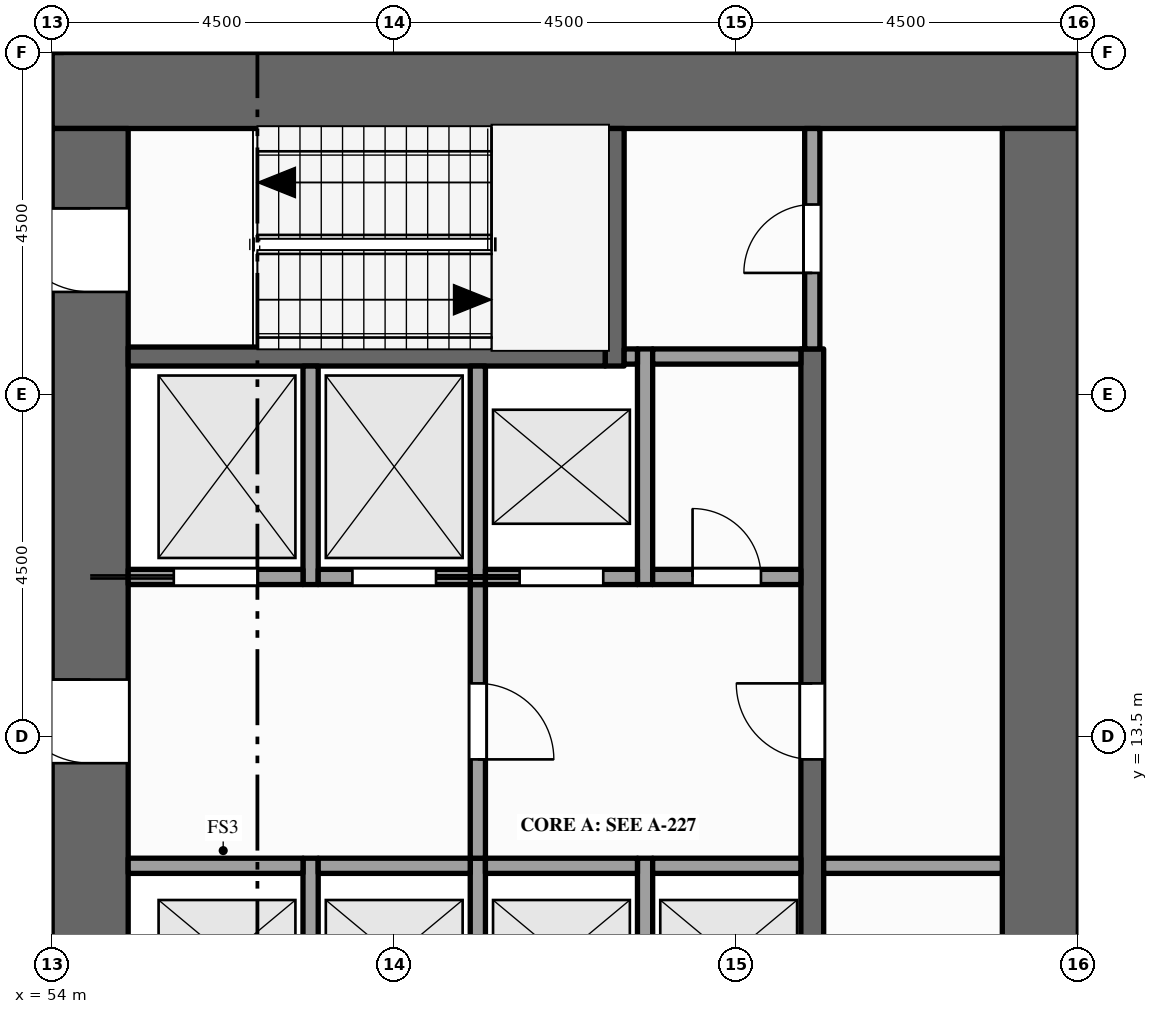
"""IFC4 building model, lengths in metres.
Left out: names, types, materials, properties, quantities, classifications, styles, units other than length and angle.
Written with IfcOpenShell. Run it as: python <this file> out.ifc"""

import sys

from ifc_helpers import new_model, si_unit, direction, frame, frame_2d, origin, place, context, subcontext, project, spatial, rectangle, extrude, element, fill, save


model = new_model("IFC4")
c1 = context("Model", 3, precision=1e-05, world=origin(), true_north=direction((0.0, 1.0)))
c2 = subcontext(c1, "Body", "Model", "MODEL_VIEW")
j1 = project(units=[si_unit("LENGTHUNIT", "METRE"), si_unit("PLANEANGLEUNIT", "RADIAN")], contexts=[c1])
p1 = place(None, origin())
s1 = spatial("IfcSite", under=j1, at=p1, CompositionType="ELEMENT")
p2 = place(p1, origin())
s2 = spatial("IfcBuilding", under=s1, at=p2, CompositionType="ELEMENT")
p3 = place(p2, frame((0.0, 0.0, 147.0)))
s3 = spatial("IfcBuildingStorey", under=s2, at=p3, CompositionType="ELEMENT", Elevation=147.0)
p4 = place(p3, frame((54.0, 22.0, -0.15), z_axis=(0.0, 0.0, 1.0), x_axis=(1.0, 0.0, 0.0)))
e1 = element("IfcWall", 1, at=p4, inside=s3, PredefinedType="SHEAR", context=c2, shape_type="SweptSolid", body=[
    extrude(rectangle(XDim=13.5, YDim=1.0, at=frame_2d((6.75, 0.0))), origin(), (0.0, 0.0, 1.0), 4.0),
])
p5 = place(p3, frame((54.5, 1.0, -0.15), z_axis=(0.0, 0.0, 1.0), x_axis=(0.0, 1.0, 0.0)))
e2 = element("IfcWall", 2, at=p5, inside=s3, PredefinedType="SHEAR", context=c2, shape_type="SweptSolid", body=[
    extrude(rectangle(XDim=20.5, YDim=1.0, at=frame_2d((10.25, 0.0))), origin(), (0.0, 0.0, 1.0), 4.0),
])
p6 = place(p5, frame((6.1, 0.0, 0.15)))
e3 = element("IfcOpeningElement", 3, at=p6, cuts=e2, PredefinedType="OPENING", context=c2, shape_type="SweptSolid", body=[
    extrude(rectangle(XDim=1.8, YDim=2.1, at=frame_2d((0.9, 1.05))), frame((0.0, 0.51, 0.0), z_axis=(0.0, -1.0, 0.0), x_axis=(1.0, 0.0, 0.0)), (0.0, 0.0, 1.0), 1.02),
])
p7 = place(p5, frame((12.15, 0.0, 0.15)))
e4 = element("IfcOpeningElement", 4, at=p7, cuts=e2, PredefinedType="OPENING", context=c2, shape_type="SweptSolid", body=[
    extrude(rectangle(XDim=1.1, YDim=2.1, at=frame_2d((0.55, 1.05))), frame((0.0, 0.51, 0.0), z_axis=(0.0, -1.0, 0.0), x_axis=(1.0, 0.0, 0.0)), (0.0, 0.0, 1.0), 1.02),
])
p8 = place(p5, frame((1.15, 0.0, 0.15)))
e5 = element("IfcOpeningElement", 5, at=p8, cuts=e2, PredefinedType="OPENING", context=c2, shape_type="SweptSolid", body=[
    extrude(rectangle(XDim=1.1, YDim=2.1, at=frame_2d((0.55, 1.05))), frame((0.0, 0.51, 0.0), z_axis=(0.0, -1.0, 0.0), x_axis=(1.0, 0.0, 0.0)), (0.0, 0.0, 1.0), 1.02),
])
p9 = place(p5, frame((18.35, 0.0, 0.15)))
e6 = element("IfcOpeningElement", 6, at=p9, cuts=e2, PredefinedType="OPENING", context=c2, shape_type="SweptSolid", body=[
    extrude(rectangle(XDim=1.1, YDim=2.1, at=frame_2d((0.55, 1.05))), frame((0.0, 0.51, 0.0), z_axis=(0.0, -1.0, 0.0), x_axis=(1.0, 0.0, 0.0)), (0.0, 0.0, 1.0), 1.02),
])
p10 = place(p3, frame((67.0, 1.0, -0.15), z_axis=(0.0, 0.0, 1.0), x_axis=(0.0, 1.0, 0.0)))
e7 = element("IfcWall", 7, at=p10, inside=s3, PredefinedType="SHEAR", context=c2, shape_type="SweptSolid", body=[
    extrude(rectangle(XDim=20.5, YDim=1.0, at=frame_2d((10.25, 0.0))), origin(), (0.0, 0.0, 1.0), 4.0),
])
p11 = place(p3, frame((54.0, 22.5, 0.0), z_axis=(0.0, 0.0, 1.0), x_axis=(0.0, 1.0, 0.0)))
e8 = element("IfcWall", 8, at=p11, inside=s3, PredefinedType="STANDARD", context=c2, shape_type="SweptSolid", body=[
    extrude(rectangle(XDim=1.05, YDim=0.3, at=frame_2d((0.525, 0.0))), origin(), (0.0, 0.0, 1.0), 3.149),
])
p12 = place(p3, frame((57.4, 9.3, 0.0), z_axis=(0.0, 0.0, 1.0), x_axis=(0.0, 1.0, 0.0)))
e9 = element("IfcWall", 9, at=p12, inside=s3, PredefinedType="SOLIDWALL", context=c2, shape_type="SweptSolid", body=[
    extrude(rectangle(XDim=2.6, YDim=0.2, at=frame_2d((1.3, 0.0))), origin(), (0.0, 0.0, 1.0), 3.85),
])
p13 = place(p3, frame((57.4, 15.5, 0.0), z_axis=(0.0, 0.0, 1.0), x_axis=(0.0, 1.0, 0.0)))
e10 = element("IfcWall", 10, at=p13, inside=s3, PredefinedType="SOLIDWALL", context=c2, shape_type="SweptSolid", body=[
    extrude(rectangle(XDim=2.875, YDim=0.2, at=frame_2d((1.438, 0.0))), origin(), (0.0, 0.0, 1.0), 3.85),
])
p14 = place(p3, frame((59.6, 9.3, 0.0), z_axis=(0.0, 0.0, 1.0), x_axis=(0.0, 1.0, 0.0)))
e11 = element("IfcWall", 11, at=p14, inside=s3, PredefinedType="SOLIDWALL", context=c2, shape_type="SweptSolid", body=[
    extrude(rectangle(XDim=2.6, YDim=0.2, at=frame_2d((1.3, 0.0))), origin(), (0.0, 0.0, 1.0), 3.85),
])
p15 = place(p3, frame((59.6, 11.9, 0.0), z_axis=(0.0, 0.0, 1.0), x_axis=(0.0, 1.0, 0.0)))
e12 = element("IfcWall", 12, at=p15, inside=s3, PredefinedType="PARTITIONING", context=c2, shape_type="SweptSolid", body=[
    extrude(rectangle(XDim=3.6, YDim=0.2, at=frame_2d((1.8, 0.0))), origin(), (0.0, 0.0, 1.0), 3.85),
])
p16 = place(p15, frame((1.3, 0.0, 0.0)))
e13 = element("IfcOpeningElement", 13, at=p16, cuts=e12, PredefinedType="OPENING", context=c2, shape_type="SweptSolid", body=[
    extrude(rectangle(XDim=1.0, YDim=2.1, at=frame_2d((0.5, 1.05))), frame((0.0, 0.11, 0.0), z_axis=(0.0, -1.0, 0.0), x_axis=(1.0, 0.0, 0.0)), (0.0, 0.0, 1.0), 0.22),
])
p17 = place(p3, frame((59.6, 15.5, 0.0), z_axis=(0.0, 0.0, 1.0), x_axis=(0.0, 1.0, 0.0)))
e14 = element("IfcWall", 14, at=p17, inside=s3, PredefinedType="SOLIDWALL", context=c2, shape_type="SweptSolid", body=[
    extrude(rectangle(XDim=2.875, YDim=0.2, at=frame_2d((1.438, 0.0))), origin(), (0.0, 0.0, 1.0), 3.85),
])
p18 = place(p3, frame((61.4, 18.375, 0.0), z_axis=(0.0, 0.0, 1.0), x_axis=(0.0, 1.0, 0.0)))
e15 = element("IfcWall", 15, at=p18, inside=s3, PredefinedType="SHEAR", context=c2, shape_type="SweptSolid", body=[
    extrude(rectangle(XDim=3.125, YDim=0.25, at=frame_2d((1.562, 0.0))), origin(), (0.0, 0.0, 1.0), 3.85),
])
p19 = place(p3, frame((61.8, 9.3, 0.0), z_axis=(0.0, 0.0, 1.0), x_axis=(0.0, 1.0, 0.0)))
e16 = element("IfcWall", 16, at=p19, inside=s3, PredefinedType="SOLIDWALL", context=c2, shape_type="SweptSolid", body=[
    extrude(rectangle(XDim=2.6, YDim=0.2, at=frame_2d((1.3, 0.0))), origin(), (0.0, 0.0, 1.0), 3.85),
])
p20 = place(p3, frame((61.8, 15.5, 0.0), z_axis=(0.0, 0.0, 1.0), x_axis=(0.0, 1.0, 0.0)))
e17 = element("IfcWall", 17, at=p20, inside=s3, PredefinedType="SOLIDWALL", context=c2, shape_type="SweptSolid", body=[
    extrude(rectangle(XDim=3.1, YDim=0.2, at=frame_2d((1.55, 0.0))), origin(), (0.0, 0.0, 1.0), 3.85),
])
p21 = place(p3, frame((64.0, 4.1, 0.0), z_axis=(0.0, 0.0, 1.0), x_axis=(0.0, 1.0, 0.0)))
e18 = element("IfcWall", 18, at=p21, inside=s3, PredefinedType="SHEAR", context=c2, shape_type="SweptSolid", body=[
    extrude(rectangle(XDim=14.5, YDim=0.3, at=frame_2d((7.25, 0.0))), origin(), (0.0, 0.0, 1.0), 3.85),
])
p22 = place(p21, frame((3.4, 0.0, 0.0)))
e19 = element("IfcOpeningElement", 19, at=p22, cuts=e18, PredefinedType="OPENING", context=c2, shape_type="SweptSolid", body=[
    extrude(rectangle(XDim=1.0, YDim=2.1, at=frame_2d((0.5, 1.05))), frame((0.0, 0.16, 0.0), z_axis=(0.0, -1.0, 0.0), x_axis=(1.0, 0.0, 0.0)), (0.0, 0.0, 1.0), 0.32),
])
p23 = place(p21, frame((9.1, 0.0, 0.0)))
e20 = element("IfcOpeningElement", 20, at=p23, cuts=e18, PredefinedType="OPENING", context=c2, shape_type="SweptSolid", body=[
    extrude(rectangle(XDim=1.0, YDim=2.1, at=frame_2d((0.5, 1.05))), frame((0.0, 0.16, 0.0), z_axis=(0.0, -1.0, 0.0), x_axis=(1.0, 0.0, 0.0)), (0.0, 0.0, 1.0), 0.32),
])
p24 = place(p3, frame((64.0, 18.6, 0.0), z_axis=(0.0, 0.0, 1.0), x_axis=(0.0, 1.0, 0.0)))
e21 = element("IfcWall", 21, at=p24, inside=s3, PredefinedType="PARTITIONING", context=c2, shape_type="SweptSolid", body=[
    extrude(rectangle(XDim=2.9, YDim=0.2, at=frame_2d((1.45, 0.0))), origin(), (0.0, 0.0, 1.0), 3.85),
])
p25 = place(p24, frame((1.0, 0.0, 0.0)))
e22 = element("IfcOpeningElement", 22, at=p25, cuts=e21, PredefinedType="OPENING", context=c2, shape_type="SweptSolid", body=[
    extrude(rectangle(XDim=0.9, YDim=2.1, at=frame_2d((0.45, 1.05))), frame((0.0, 0.11, 0.0), z_axis=(0.0, -1.0, 0.0), x_axis=(1.0, 0.0, 0.0)), (0.0, 0.0, 1.0), 0.22),
])
p26 = place(p3, frame((55.0, 11.8, 0.0), z_axis=(0.0, 0.0, 1.0), x_axis=(1.0, 0.0, 0.0)))
e23 = element("IfcWall", 23, at=p26, inside=s3, PredefinedType="SOLIDWALL", context=c2, shape_type="SweptSolid", body=[
    extrude(rectangle(XDim=2.3, YDim=0.2, at=frame_2d((1.15, 0.0))), origin(), (0.0, 0.0, 1.0), 3.85),
])
for number, where, z_axis, x_axis in (
    (24, (57.5, 11.8, 0.0), (0.0, 0.0, 1.0), (1.0, 0.0, 0.0)),
    (25, (59.7, 11.8, 0.0), (0.0, 0.0, 1.0), (1.0, 0.0, 0.0)),
):
    element("IfcWall", number, at=place(p3, frame(where, z_axis=z_axis, x_axis=x_axis)), inside=s3, PredefinedType="SOLIDWALL", context=c2, shape_type="SweptSolid", body=[
        extrude(rectangle(XDim=2.0, YDim=0.2, at=frame_2d((1.0, 0.0))), origin(), (0.0, 0.0, 1.0), 3.85),
    ])
p27 = place(p3, frame((61.9, 11.8, 0.0), z_axis=(0.0, 0.0, 1.0), x_axis=(1.0, 0.0, 0.0)))
e26 = element("IfcWall", 26, at=p27, inside=s3, PredefinedType="SOLIDWALL", context=c2, shape_type="SweptSolid", body=[
    extrude(rectangle(XDim=1.95, YDim=0.2, at=frame_2d((0.975, 0.0))), origin(), (0.0, 0.0, 1.0), 3.85),
])
p28 = place(p3, frame((64.15, 11.8, 0.0), z_axis=(0.0, 0.0, 1.0), x_axis=(1.0, 0.0, 0.0)))
e27 = element("IfcWall", 27, at=p28, inside=s3, PredefinedType="PARTITIONING", context=c2, shape_type="SweptSolid", body=[
    extrude(rectangle(XDim=2.35, YDim=0.2, at=frame_2d((1.175, 0.0))), origin(), (0.0, 0.0, 1.0), 3.85),
])
p29 = place(p3, frame((55.0, 15.6, 0.0), z_axis=(0.0, 0.0, 1.0), x_axis=(1.0, 0.0, 0.0)))
e28 = element("IfcWall", 28, at=p29, inside=s3, PredefinedType="SOLIDWALL", context=c2, shape_type="SweptSolid", body=[
    extrude(rectangle(XDim=2.3, YDim=0.2, at=frame_2d((1.15, 0.0))), origin(), (0.0, 0.0, 1.0), 3.85),
])
p30 = place(p29, frame((0.6, 0.0, 0.012)))
e29 = element("IfcOpeningElement", 29, at=p30, cuts=e28, PredefinedType="OPENING", context=c2, shape_type="SweptSolid", body=[
    extrude(rectangle(XDim=1.1, YDim=2.1, at=frame_2d((0.55, 1.05))), frame((0.0, 0.11, 0.0), z_axis=(0.0, -1.0, 0.0), x_axis=(1.0, 0.0, 0.0)), (0.0, 0.0, 1.0), 0.22),
])
p31 = place(p3, frame((57.5, 15.6, 0.0), z_axis=(0.0, 0.0, 1.0), x_axis=(1.0, 0.0, 0.0)))
e30 = element("IfcWall", 30, at=p31, inside=s3, PredefinedType="SOLIDWALL", context=c2, shape_type="SweptSolid", body=[
    extrude(rectangle(XDim=2.0, YDim=0.2, at=frame_2d((1.0, 0.0))), origin(), (0.0, 0.0, 1.0), 3.85),
])
p32 = place(p31, frame((0.45, 0.0, 0.012)))
e31 = element("IfcOpeningElement", 31, at=p32, cuts=e30, PredefinedType="OPENING", context=c2, shape_type="SweptSolid", body=[
    extrude(rectangle(XDim=1.1, YDim=2.1, at=frame_2d((0.55, 1.05))), frame((0.0, 0.11, 0.0), z_axis=(0.0, -1.0, 0.0), x_axis=(1.0, 0.0, 0.0)), (0.0, 0.0, 1.0), 0.22),
])
p33 = place(p3, frame((59.7, 15.6, 0.0), z_axis=(0.0, 0.0, 1.0), x_axis=(1.0, 0.0, 0.0)))
e32 = element("IfcWall", 32, at=p33, inside=s3, PredefinedType="SOLIDWALL", context=c2, shape_type="SweptSolid", body=[
    extrude(rectangle(XDim=2.0, YDim=0.2, at=frame_2d((1.0, 0.0))), origin(), (0.0, 0.0, 1.0), 3.85),
])
p34 = place(p33, frame((0.45, 0.0, 0.012)))
e33 = element("IfcOpeningElement", 33, at=p34, cuts=e32, PredefinedType="OPENING", context=c2, shape_type="SweptSolid", body=[
    extrude(rectangle(XDim=1.1, YDim=2.1, at=frame_2d((0.55, 1.05))), frame((0.0, 0.11, 0.0), z_axis=(0.0, -1.0, 0.0), x_axis=(1.0, 0.0, 0.0)), (0.0, 0.0, 1.0), 0.22),
])
p35 = place(p3, frame((61.9, 15.6, 0.0), z_axis=(0.0, 0.0, 1.0), x_axis=(1.0, 0.0, 0.0)))
e34 = element("IfcWall", 34, at=p35, inside=s3, PredefinedType="PARTITIONING", context=c2, shape_type="SweptSolid", body=[
    extrude(rectangle(XDim=1.95, YDim=0.2, at=frame_2d((0.975, 0.0))), origin(), (0.0, 0.0, 1.0), 3.85),
])
p36 = place(p35, frame((0.525, 0.0, 0.0)))
e35 = element("IfcOpeningElement", 35, at=p36, cuts=e34, PredefinedType="OPENING", context=c2, shape_type="SweptSolid", body=[
    extrude(rectangle(XDim=0.9, YDim=2.1, at=frame_2d((0.45, 1.05))), frame((0.0, 0.11, 0.0), z_axis=(0.0, -1.0, 0.0), x_axis=(1.0, 0.0, 0.0)), (0.0, 0.0, 1.0), 0.22),
])
p37 = place(p3, frame((55.0, 18.5, 0.0), z_axis=(0.0, 0.0, 1.0), x_axis=(1.0, 0.0, 0.0)))
e36 = element("IfcWall", 36, at=p37, inside=s3, PredefinedType="SHEAR", context=c2, shape_type="SweptSolid", body=[
    extrude(rectangle(XDim=6.275, YDim=0.25, at=frame_2d((3.137, 0.0))), origin(), (0.0, 0.0, 1.0), 3.85),
])
p38 = place(p3, frame((61.525, 18.5, 0.0), z_axis=(0.0, 0.0, 1.0), x_axis=(1.0, 0.0, 0.0)))
e37 = element("IfcWall", 37, at=p38, inside=s3, PredefinedType="SOLIDWALL", context=c2, shape_type="SweptSolid", body=[
    extrude(rectangle(XDim=0.175, YDim=0.2, at=frame_2d((0.087, 0.0))), origin(), (0.0, 0.0, 1.0), 3.85),
])
p39 = place(p3, frame((61.9, 18.5, 0.0), z_axis=(0.0, 0.0, 1.0), x_axis=(1.0, 0.0, 0.0)))
e38 = element("IfcWall", 38, at=p39, inside=s3, PredefinedType="PARTITIONING", context=c2, shape_type="SweptSolid", body=[
    extrude(rectangle(XDim=1.95, YDim=0.2, at=frame_2d((0.975, 0.0))), origin(), (0.0, 0.0, 1.0), 3.85),
])
p40 = place(p30, origin())
e39 = element("IfcDoor", 39, at=p40, inside=s3, OperationType="SLIDING_TO_LEFT", PredefinedType="DOOR", context=c2, shape_type="SweptSolid", body=[
    extrude(rectangle(XDim=1.1, YDim=2.1, at=frame_2d((0.55, 1.05))), frame((0.0, 0.025, 0.0), z_axis=(0.0, -1.0, 0.0), x_axis=(1.0, 0.0, 0.0)), (0.0, 0.0, 1.0), 0.05),
])
fill(e29, e39)
p41 = place(p32, origin())
e40 = element("IfcDoor", 40, at=p41, inside=s3, OperationType="SLIDING_TO_RIGHT", PredefinedType="DOOR", context=c2, shape_type="SweptSolid", body=[
    extrude(rectangle(XDim=1.1, YDim=2.1, at=frame_2d((0.55, 1.05))), frame((0.0, 0.025, 0.0), z_axis=(0.0, -1.0, 0.0), x_axis=(1.0, 0.0, 0.0)), (0.0, 0.0, 1.0), 0.05),
])
fill(e31, e40)
p42 = place(p34, origin())
e41 = element("IfcDoor", 41, at=p42, inside=s3, OperationType="SLIDING_TO_LEFT", PredefinedType="DOOR", context=c2, shape_type="SweptSolid", body=[
    extrude(rectangle(XDim=1.1, YDim=2.1, at=frame_2d((0.55, 1.05))), frame((0.0, 0.025, 0.0), z_axis=(0.0, -1.0, 0.0), x_axis=(1.0, 0.0, 0.0)), (0.0, 0.0, 1.0), 0.05),
])
fill(e33, e41)
p43 = place(p7, origin())
e42 = element("IfcDoor", 42, at=p43, inside=s3, OperationType="SINGLE_SWING_RIGHT", PredefinedType="DOOR", context=c2, shape_type="SweptSolid", body=[
    extrude(rectangle(XDim=1.1, YDim=2.1, at=frame_2d((0.55, 1.05))), frame((0.0, 0.025, 0.0), z_axis=(0.0, -1.0, 0.0), x_axis=(1.0, 0.0, 0.0)), (0.0, 0.0, 1.0), 0.05),
])
fill(e4, e42)
p44 = place(p16, origin())
e43 = element("IfcDoor", 43, at=p44, inside=s3, OperationType="SINGLE_SWING_LEFT", PredefinedType="DOOR", context=c2, shape_type="SweptSolid", body=[
    extrude(rectangle(XDim=1.0, YDim=2.1, at=frame_2d((0.5, 1.05))), frame((0.0, 0.025, 0.0), z_axis=(0.0, -1.0, 0.0), x_axis=(1.0, 0.0, 0.0)), (0.0, 0.0, 1.0), 0.05),
])
fill(e13, e43)
p45 = place(p23, origin())
e44 = element("IfcDoor", 44, at=p45, inside=s3, OperationType="SINGLE_SWING_RIGHT", PredefinedType="DOOR", context=c2, shape_type="SweptSolid", body=[
    extrude(rectangle(XDim=1.0, YDim=2.1, at=frame_2d((0.5, 1.05))), frame((0.0, 0.025, 0.0), z_axis=(0.0, -1.0, 0.0), x_axis=(1.0, 0.0, 0.0)), (0.0, 0.0, 1.0), 0.05),
])
fill(e20, e44)
p46 = place(p9, origin())
e45 = element("IfcDoor", 45, at=p46, inside=s3, OperationType="SINGLE_SWING_RIGHT", PredefinedType="DOOR", context=c2, shape_type="SweptSolid", body=[
    extrude(rectangle(XDim=1.1, YDim=2.1, at=frame_2d((0.55, 1.05))), frame((0.0, 0.025, 0.0), z_axis=(0.0, -1.0, 0.0), x_axis=(1.0, 0.0, 0.0)), (0.0, 0.0, 1.0), 0.05),
])
fill(e6, e45)
p47 = place(p25, origin())
e46 = element("IfcDoor", 46, at=p47, inside=s3, OperationType="SINGLE_SWING_LEFT", PredefinedType="DOOR", context=c2, shape_type="SweptSolid", body=[
    extrude(rectangle(XDim=0.9, YDim=2.1, at=frame_2d((0.45, 1.05))), frame((0.0, 0.025, 0.0), z_axis=(0.0, -1.0, 0.0), x_axis=(1.0, 0.0, 0.0)), (0.0, 0.0, 1.0), 0.05),
])
fill(e22, e46)
p48 = place(p36, origin())
e47 = element("IfcDoor", 47, at=p48, inside=s3, OperationType="SINGLE_SWING_LEFT", PredefinedType="DOOR", context=c2, shape_type="SweptSolid", body=[
    extrude(rectangle(XDim=0.9, YDim=2.1, at=frame_2d((0.45, 1.05))), frame((0.0, 0.025, 0.0), z_axis=(0.0, -1.0, 0.0), x_axis=(1.0, 0.0, 0.0)), (0.0, 0.0, 1.0), 0.05),
])
fill(e35, e47)
save(model, sys.argv[1])
